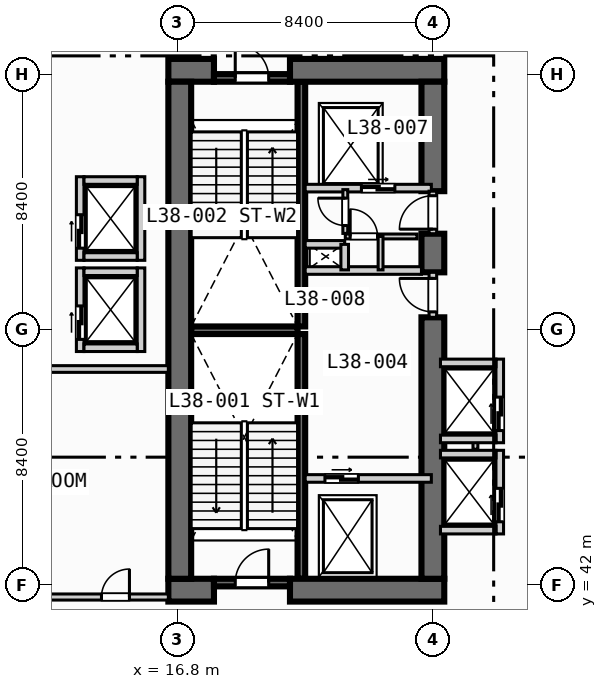
"""IFC4 building model, lengths in metres.
Left out: names, types, materials, properties, quantities, classifications, styles, units other than length and angle.
Written with IfcOpenShell. Run it as: python <this file> out.ifc"""

import sys

from ifc_helpers import new_model, si_unit, direction, frame, frame_2d, origin, place, context, subcontext, project, spatial, rectangle, extrude, element, fill, save


model = new_model("IFC4")
c1 = context("Model", 3, precision=1e-05, world=origin(), true_north=direction((0.0, 1.0)))
c2 = subcontext(c1, "Body", "Model", "MODEL_VIEW")
j1 = project(units=[si_unit("LENGTHUNIT", "METRE"), si_unit("PLANEANGLEUNIT", "RADIAN")], contexts=[c1])
p1 = place(None, origin())
s1 = spatial("IfcSite", under=j1, at=p1, CompositionType="ELEMENT")
p2 = place(p1, origin())
s2 = spatial("IfcBuilding", under=s1, at=p2, CompositionType="ELEMENT")
p3 = place(p2, frame((0.0, 0.0, 157.6)))
s3 = spatial("IfcBuildingStorey", under=s2, at=p3, CompositionType="ELEMENT", Elevation=157.6)
for number, where, z_axis, x_axis in (
    (1, (20.875, 42.2, 0.0), (0.0, 0.0, 1.0), (0.0, 1.0, 0.0)),
    (2, (20.875, 50.5, 0.0), (0.0, 0.0, 1.0), (0.0, 1.0, 0.0)),
):
    element("IfcWall", number, at=place(p3, frame(where, z_axis=z_axis, x_axis=x_axis)), inside=s3, PredefinedType="SOLIDWALL", context=c2, shape_type="SweptSolid", body=[
        extrude(rectangle(XDim=8.05, YDim=0.25, at=frame_2d((4.025, 0.0))), origin(), (0.0, 0.0, 1.0), 4.05),
    ])
p4 = place(p3, frame((17.25, 50.375, 0.0), z_axis=(0.0, 0.0, 1.0), x_axis=(1.0, 0.0, 0.0)))
e3 = element("IfcWall", 3, at=p4, inside=s3, PredefinedType="SOLIDWALL", context=c2, shape_type="SweptSolid", body=[
    extrude(rectangle(XDim=3.5, YDim=0.25, at=frame_2d((1.75, 0.0))), origin(), (0.0, 0.0, 1.0), 4.05),
])
p5 = place(p3, frame((16.5, 41.825, 0.0), z_axis=(0.0, 0.0, 1.0), x_axis=(1.0, 0.0, 0.0)))
e4 = element("IfcWall", 4, at=p5, inside=s3, PredefinedType="SHEAR", context=c2, shape_type="SweptSolid", body=[
    extrude(rectangle(XDim=1.5, YDim=0.75, at=frame_2d((0.75, 0.0))), origin(), (0.0, 0.0, 1.0), 4.05),
])
p6 = place(p3, frame((20.5, 41.825, 0.0), z_axis=(0.0, 0.0, 1.0), x_axis=(1.0, 0.0, 0.0)))
e5 = element("IfcWall", 5, at=p6, inside=s3, PredefinedType="SHEAR", context=c2, shape_type="SweptSolid", body=[
    extrude(rectangle(XDim=5.075, YDim=0.75, at=frame_2d((2.538, 0.0))), origin(), (0.0, 0.0, 1.0), 4.05),
])
p7 = place(p3, frame((16.5, 58.925, 0.0), z_axis=(0.0, 0.0, 1.0), x_axis=(1.0, 0.0, 0.0)))
e6 = element("IfcWall", 6, at=p7, inside=s3, PredefinedType="SHEAR", context=c2, shape_type="SweptSolid", body=[
    extrude(rectangle(XDim=1.5, YDim=0.75, at=frame_2d((0.75, 0.0))), origin(), (0.0, 0.0, 1.0), 4.05),
])
p8 = place(p3, frame((20.5, 58.925, 0.0), z_axis=(0.0, 0.0, 1.0), x_axis=(1.0, 0.0, 0.0)))
e7 = element("IfcWall", 7, at=p8, inside=s3, PredefinedType="SHEAR", context=c2, shape_type="SweptSolid", body=[
    extrude(rectangle(XDim=5.075, YDim=0.75, at=frame_2d((2.538, 0.0))), origin(), (0.0, 0.0, 1.0), 4.05),
])
p9 = place(p3, frame((16.875, 42.2, 0.0), z_axis=(0.0, 0.0, 1.0), x_axis=(0.0, 1.0, 0.0)))
e8 = element("IfcWall", 8, at=p9, inside=s3, PredefinedType="SHEAR", context=c2, shape_type="SweptSolid", body=[
    extrude(rectangle(XDim=16.35, YDim=0.75, at=frame_2d((8.175, 0.0))), origin(), (0.0, 0.0, 1.0), 4.05),
])
p10 = place(p3, frame((25.2, 42.2, 0.0), z_axis=(0.0, 0.0, 1.0), x_axis=(0.0, 1.0, 0.0)))
e9 = element("IfcWall", 9, at=p10, inside=s3, PredefinedType="SHEAR", context=c2, shape_type="SweptSolid", body=[
    extrude(rectangle(XDim=8.6, YDim=0.75, at=frame_2d((4.3, 0.0))), origin(), (0.0, 0.0, 1.0), 4.05),
])
p11 = place(p3, frame((25.2, 52.28, 0.0), z_axis=(0.0, 0.0, 1.0), x_axis=(0.0, 1.0, 0.0)))
e10 = element("IfcWall", 10, at=p11, inside=s3, PredefinedType="SHEAR", context=c2, shape_type="SweptSolid", body=[
    extrude(rectangle(XDim=1.27, YDim=0.75, at=frame_2d((0.635, 0.0))), origin(), (0.0, 0.0, 1.0), 4.05),
])
p12 = place(p3, frame((25.2, 54.95, 0.0), z_axis=(0.0, 0.0, 1.0), x_axis=(0.0, 1.0, 0.0)))
e11 = element("IfcWall", 11, at=p12, inside=s3, PredefinedType="SHEAR", context=c2, shape_type="SweptSolid", body=[
    extrude(rectangle(XDim=3.6, YDim=0.75, at=frame_2d((1.8, 0.0))), origin(), (0.0, 0.0, 1.0), 4.05),
])
p13 = place(p3, frame((18.0, 42.075, 0.0), z_axis=(0.0, 0.0, 1.0), x_axis=(1.0, 0.0, 0.0)))
e12 = element("IfcWall", 12, at=p13, inside=s3, PredefinedType="SOLIDWALL", context=c2, shape_type="SweptSolid", body=[
    extrude(rectangle(XDim=2.5, YDim=0.25, at=frame_2d((1.25, 0.0))), origin(), (0.0, 0.0, 1.0), 4.05),
])
p14 = place(p13, frame((0.7, 0.0, 0.0)))
e13 = element("IfcOpeningElement", 13, at=p14, cuts=e12, PredefinedType="OPENING", context=c2, shape_type="SweptSolid", body=[
    extrude(rectangle(XDim=1.1, YDim=2.15, at=frame_2d((0.55, 1.075))), frame((0.0, 0.135, 0.0), z_axis=(0.0, -1.0, 0.0), x_axis=(1.0, 0.0, 0.0)), (0.0, 0.0, 1.0), 0.27),
])
p15 = place(p3, frame((18.0, 58.675, 0.0), z_axis=(0.0, 0.0, 1.0), x_axis=(1.0, 0.0, 0.0)))
e14 = element("IfcWall", 14, at=p15, inside=s3, PredefinedType="SOLIDWALL", context=c2, shape_type="SweptSolid", body=[
    extrude(rectangle(XDim=2.5, YDim=0.25, at=frame_2d((1.25, 0.0))), origin(), (0.0, 0.0, 1.0), 4.05),
])
p16 = place(p15, frame((0.7, 0.0, 0.0)))
e15 = element("IfcOpeningElement", 15, at=p16, cuts=e14, PredefinedType="OPENING", context=c2, shape_type="SweptSolid", body=[
    extrude(rectangle(XDim=1.1, YDim=2.15, at=frame_2d((0.55, 1.075))), frame((0.0, 0.135, 0.0), z_axis=(0.0, -1.0, 0.0), x_axis=(1.0, 0.0, 0.0)), (0.0, 0.0, 1.0), 0.27),
])
p17 = place(p3, frame((21.0, 45.5, 0.0), z_axis=(0.0, 0.0, 1.0), x_axis=(1.0, 0.0, 0.0)))
e16 = element("IfcWall", 16, at=p17, inside=s3, PredefinedType="SOLIDWALL", context=c2, shape_type="SweptSolid", body=[
    extrude(rectangle(XDim=4.15, YDim=0.25, at=frame_2d((2.075, 0.0))), origin(), (0.0, 0.0, 1.0), 4.05),
])
p18 = place(p17, frame((0.65, 0.0, 0.0)))
e17 = element("IfcOpeningElement", 17, at=p18, cuts=e16, PredefinedType="OPENING", context=c2, shape_type="SweptSolid", body=[
    extrude(rectangle(XDim=1.1, YDim=2.15, at=frame_2d((0.55, 1.075))), frame((0.0, 0.135, 0.0), z_axis=(0.0, -1.0, 0.0), x_axis=(1.0, 0.0, 0.0)), (0.0, 0.0, 1.0), 0.27),
])
p19 = place(p3, frame((25.2, 50.8, 0.0), z_axis=(0.0, 0.0, 1.0), x_axis=(0.0, 1.0, 0.0)))
e18 = element("IfcWall", 18, at=p19, inside=s3, PredefinedType="SOLIDWALL", context=c2, shape_type="SweptSolid", body=[
    extrude(rectangle(XDim=1.48, YDim=0.25, at=frame_2d((0.74, 0.0))), origin(), (0.0, 0.0, 1.0), 4.05),
])
p20 = place(p19, frame((0.18, 0.0, 0.0)))
e19 = element("IfcOpeningElement", 19, at=p20, cuts=e18, PredefinedType="OPENING", context=c2, shape_type="SweptSolid", body=[
    extrude(rectangle(XDim=1.1, YDim=2.15, at=frame_2d((0.55, 1.075))), frame((0.0, 0.135, 0.0), z_axis=(0.0, -1.0, 0.0), x_axis=(1.0, 0.0, 0.0)), (0.0, 0.0, 1.0), 0.27),
])
p21 = place(p3, frame((21.0, 52.34, 0.0), z_axis=(0.0, 0.0, 1.0), x_axis=(1.0, 0.0, 0.0)))
e20 = element("IfcWall", 20, at=p21, inside=s3, PredefinedType="SOLIDWALL", context=c2, shape_type="SweptSolid", body=[
    extrude(rectangle(XDim=3.825, YDim=0.25, at=frame_2d((1.913, 0.0))), origin(), (0.0, 0.0, 1.0), 4.05),
])
p22 = place(p3, frame((21.0, 55.05, 0.0), z_axis=(0.0, 0.0, 1.0), x_axis=(1.0, 0.0, 0.0)))
e21 = element("IfcWall", 21, at=p22, inside=s3, PredefinedType="SOLIDWALL", context=c2, shape_type="SweptSolid", body=[
    extrude(rectangle(XDim=4.15, YDim=0.25, at=frame_2d((2.075, 0.0))), origin(), (0.0, 0.0, 1.0), 4.05),
])
p23 = place(p22, frame((1.85, 0.0, 0.0)))
e22 = element("IfcOpeningElement", 22, at=p23, cuts=e21, PredefinedType="OPENING", context=c2, shape_type="SweptSolid", body=[
    extrude(rectangle(XDim=1.1, YDim=2.15, at=frame_2d((0.55, 1.075))), frame((0.0, 0.135, 0.0), z_axis=(0.0, -1.0, 0.0), x_axis=(1.0, 0.0, 0.0)), (0.0, 0.0, 1.0), 0.27),
])
p24 = place(p3, frame((25.2, 53.55, 0.0), z_axis=(0.0, 0.0, 1.0), x_axis=(0.0, 1.0, 0.0)))
e23 = element("IfcWall", 23, at=p24, inside=s3, PredefinedType="SOLIDWALL", context=c2, shape_type="SweptSolid", body=[
    extrude(rectangle(XDim=1.4, YDim=0.25, at=frame_2d((0.7, 0.0))), origin(), (0.0, 0.0, 1.0), 4.05),
])
p25 = place(p24, frame((0.15, 0.0, 0.0)))
e24 = element("IfcOpeningElement", 24, at=p25, cuts=e23, PredefinedType="OPENING", context=c2, shape_type="SweptSolid", body=[
    extrude(rectangle(XDim=1.1, YDim=2.15, at=frame_2d((0.55, 1.075))), frame((0.0, 0.135, 0.0), z_axis=(0.0, -1.0, 0.0), x_axis=(1.0, 0.0, 0.0)), (0.0, 0.0, 1.0), 0.27),
])
p26 = place(p3, frame((21.0, 53.2, 0.0), z_axis=(0.0, 0.0, 1.0), x_axis=(1.0, 0.0, 0.0)))
e25 = element("IfcWall", 25, at=p26, inside=s3, PredefinedType="SOLIDWALL", context=c2, shape_type="SweptSolid", body=[
    extrude(rectangle(XDim=1.3, YDim=0.25, at=frame_2d((0.65, 0.0))), origin(), (0.0, 0.0, 1.0), 4.05),
])
p27 = place(p3, frame((22.3, 52.36, 0.0), z_axis=(0.0, 0.0, 1.0), x_axis=(0.0, 1.0, 0.0)))
e26 = element("IfcWall", 26, at=p27, inside=s3, PredefinedType="SOLIDWALL", context=c2, shape_type="SweptSolid", body=[
    extrude(rectangle(XDim=0.84, YDim=0.25, at=frame_2d((0.42, 0.0))), origin(), (0.0, 0.0, 1.0), 4.05),
])
p28 = place(p3, frame((22.32, 53.56, 0.0), z_axis=(0.0, 0.0, 1.0), x_axis=(0.0, 1.0, 0.0)))
e27 = element("IfcWall", 27, at=p28, inside=s3, PredefinedType="PARTITIONING", context=c2, shape_type="SweptSolid", body=[
    extrude(rectangle(XDim=1.44, YDim=0.16, at=frame_2d((0.72, 0.0))), origin(), (0.0, 0.0, 1.0), 4.05),
])
p29 = place(p28, frame((0.26, 0.0, 0.0)))
e28 = element("IfcOpeningElement", 28, at=p29, cuts=e27, PredefinedType="OPENING", context=c2, shape_type="SweptSolid", body=[
    extrude(rectangle(XDim=0.9, YDim=2.1, at=frame_2d((0.45, 1.05))), frame((0.0, 0.09, 0.0), z_axis=(0.0, -1.0, 0.0), x_axis=(1.0, 0.0, 0.0)), (0.0, 0.0, 1.0), 0.18),
])
p30 = place(p3, frame((22.32, 53.46, 0.0), z_axis=(0.0, 0.0, 1.0), x_axis=(1.0, 0.0, 0.0)))
e29 = element("IfcWall", 29, at=p30, inside=s3, PredefinedType="PARTITIONING", context=c2, shape_type="SweptSolid", body=[
    extrude(rectangle(XDim=2.36, YDim=0.16, at=frame_2d((1.18, 0.0))), origin(), (0.0, 0.0, 1.0), 4.05),
])
p31 = place(p30, frame((0.16, 0.0, 0.0)))
e30 = element("IfcOpeningElement", 30, at=p31, cuts=e29, PredefinedType="OPENING", context=c2, shape_type="SweptSolid", body=[
    extrude(rectangle(XDim=0.9, YDim=2.1, at=frame_2d((0.45, 1.05))), frame((0.0, 0.09, 0.0), z_axis=(0.0, -1.0, 0.0), x_axis=(1.0, 0.0, 0.0)), (0.0, 0.0, 1.0), 0.18),
])
p32 = place(p3, frame((23.48, 52.36, 0.0), z_axis=(0.0, 0.0, 1.0), x_axis=(0.0, 1.0, 0.0)))
e31 = element("IfcWall", 31, at=p32, inside=s3, PredefinedType="PARTITIONING", context=c2, shape_type="SweptSolid", body=[
    extrude(rectangle(XDim=1.1, YDim=0.16, at=frame_2d((0.55, 0.0))), origin(), (0.0, 0.0, 1.0), 4.05),
])
p33 = place(p3, frame((13.6, 49.675, 0.0), z_axis=(0.0, 0.0, 1.0), x_axis=(0.0, 1.0, 0.0)))
e32 = element("IfcWall", 32, at=p33, inside=s3, PredefinedType="SOLIDWALL", context=c2, shape_type="SweptSolid", body=[
    extrude(rectangle(XDim=2.75, YDim=0.25, at=frame_2d((1.375, 0.0))), origin(), (0.0, 0.0, 1.0), 4.05),
])
p34 = place(p33, frame((0.4, 0.0, 0.0)))
e33 = element("IfcOpeningElement", 33, at=p34, cuts=e32, PredefinedType="OPENING", context=c2, shape_type="SweptSolid", body=[
    extrude(rectangle(XDim=1.1, YDim=2.15, at=frame_2d((0.55, 1.075))), frame((0.0, 0.135, 0.0), z_axis=(0.0, -1.0, 0.0), x_axis=(1.0, 0.0, 0.0)), (0.0, 0.0, 1.0), 0.27),
])
p35 = place(p3, frame((15.6, 49.675, 0.0), z_axis=(0.0, 0.0, 1.0), x_axis=(0.0, 1.0, 0.0)))
e34 = element("IfcWall", 34, at=p35, inside=s3, PredefinedType="SOLIDWALL", context=c2, shape_type="SweptSolid", body=[
    extrude(rectangle(XDim=2.75, YDim=0.25, at=frame_2d((1.375, 0.0))), origin(), (0.0, 0.0, 1.0), 4.05),
])
for number, where, z_axis, x_axis in (
    (35, (13.725, 49.8, 0.0), (0.0, 0.0, 1.0), (1.0, 0.0, 0.0)),
    (36, (13.725, 52.3, 0.0), (0.0, 0.0, 1.0), (1.0, 0.0, 0.0)),
):
    element("IfcWall", number, at=place(p3, frame(where, z_axis=z_axis, x_axis=x_axis)), inside=s3, PredefinedType="SOLIDWALL", context=c2, shape_type="SweptSolid", body=[
        extrude(rectangle(XDim=1.75, YDim=0.25, at=frame_2d((0.875, 0.0))), origin(), (0.0, 0.0, 1.0), 4.05),
    ])
p36 = place(p3, frame((13.6, 52.675, 0.0), z_axis=(0.0, 0.0, 1.0), x_axis=(0.0, 1.0, 0.0)))
e37 = element("IfcWall", 37, at=p36, inside=s3, PredefinedType="SOLIDWALL", context=c2, shape_type="SweptSolid", body=[
    extrude(rectangle(XDim=2.75, YDim=0.25, at=frame_2d((1.375, 0.0))), origin(), (0.0, 0.0, 1.0), 4.05),
])
p37 = place(p36, frame((0.4, 0.0, 0.0)))
e38 = element("IfcOpeningElement", 38, at=p37, cuts=e37, PredefinedType="OPENING", context=c2, shape_type="SweptSolid", body=[
    extrude(rectangle(XDim=1.1, YDim=2.15, at=frame_2d((0.55, 1.075))), frame((0.0, 0.135, 0.0), z_axis=(0.0, -1.0, 0.0), x_axis=(1.0, 0.0, 0.0)), (0.0, 0.0, 1.0), 0.27),
])
p38 = place(p3, frame((15.6, 52.675, 0.0), z_axis=(0.0, 0.0, 1.0), x_axis=(0.0, 1.0, 0.0)))
e39 = element("IfcWall", 39, at=p38, inside=s3, PredefinedType="SOLIDWALL", context=c2, shape_type="SweptSolid", body=[
    extrude(rectangle(XDim=2.75, YDim=0.25, at=frame_2d((1.375, 0.0))), origin(), (0.0, 0.0, 1.0), 4.05),
])
for number, where, z_axis, x_axis in (
    (40, (13.725, 52.8, 0.0), (0.0, 0.0, 1.0), (1.0, 0.0, 0.0)),
    (41, (13.725, 55.3, 0.0), (0.0, 0.0, 1.0), (1.0, 0.0, 0.0)),
):
    element("IfcWall", number, at=place(p3, frame(where, z_axis=z_axis, x_axis=x_axis)), inside=s3, PredefinedType="SOLIDWALL", context=c2, shape_type="SweptSolid", body=[
        extrude(rectangle(XDim=1.75, YDim=0.25, at=frame_2d((0.875, 0.0))), origin(), (0.0, 0.0, 1.0), 4.05),
    ])
p39 = place(p3, frame((27.4, 43.675, 0.0), z_axis=(0.0, 0.0, 1.0), x_axis=(0.0, 1.0, 0.0)))
e42 = element("IfcWall", 42, at=p39, inside=s3, PredefinedType="SOLIDWALL", context=c2, shape_type="SweptSolid", body=[
    extrude(rectangle(XDim=2.75, YDim=0.25, at=frame_2d((1.375, 0.0))), origin(), (0.0, 0.0, 1.0), 4.05),
])
p40 = place(p39, frame((0.4, 0.0, 0.0)))
e43 = element("IfcOpeningElement", 43, at=p40, cuts=e42, PredefinedType="OPENING", context=c2, shape_type="SweptSolid", body=[
    extrude(rectangle(XDim=1.1, YDim=2.15, at=frame_2d((0.55, 1.075))), frame((0.0, 0.135, 0.0), z_axis=(0.0, -1.0, 0.0), x_axis=(1.0, 0.0, 0.0)), (0.0, 0.0, 1.0), 0.27),
])
for number, where, z_axis, x_axis in (
    (44, (25.45, 43.8, 0.0), (0.0, 0.0, 1.0), (1.0, 0.0, 0.0)),
    (45, (25.45, 46.3, 0.0), (0.0, 0.0, 1.0), (1.0, 0.0, 0.0)),
):
    element("IfcWall", number, at=place(p3, frame(where, z_axis=z_axis, x_axis=x_axis)), inside=s3, PredefinedType="SOLIDWALL", context=c2, shape_type="SweptSolid", body=[
        extrude(rectangle(XDim=1.825, YDim=0.25, at=frame_2d((0.913, 0.0))), origin(), (0.0, 0.0, 1.0), 4.05),
    ])
p41 = place(p3, frame((26.6, 46.46, 0.0), z_axis=(0.0, 0.0, 1.0), x_axis=(0.0, 1.0, 0.0)))
e46 = element("IfcWall", 46, at=p41, inside=s3, PredefinedType="PARTITIONING", context=c2, shape_type="SweptSolid", body=[
    extrude(rectangle(XDim=0.88, YDim=0.16, at=frame_2d((0.44, 0.0))), origin(), (0.0, 0.0, 1.0), 4.05),
])
p42 = place(p3, frame((27.4, 46.675, 0.0), z_axis=(0.0, 0.0, 1.0), x_axis=(0.0, 1.0, 0.0)))
e47 = element("IfcWall", 47, at=p42, inside=s3, PredefinedType="SOLIDWALL", context=c2, shape_type="SweptSolid", body=[
    extrude(rectangle(XDim=2.75, YDim=0.25, at=frame_2d((1.375, 0.0))), origin(), (0.0, 0.0, 1.0), 4.05),
])
p43 = place(p42, frame((0.4, 0.0, 0.0)))
e48 = element("IfcOpeningElement", 48, at=p43, cuts=e47, PredefinedType="OPENING", context=c2, shape_type="SweptSolid", body=[
    extrude(rectangle(XDim=1.1, YDim=2.15, at=frame_2d((0.55, 1.075))), frame((0.0, 0.135, 0.0), z_axis=(0.0, -1.0, 0.0), x_axis=(1.0, 0.0, 0.0)), (0.0, 0.0, 1.0), 0.27),
])
for number, where, z_axis, x_axis in (
    (49, (25.45, 46.8, 0.0), (0.0, 0.0, 1.0), (1.0, 0.0, 0.0)),
    (50, (25.45, 49.3, 0.0), (0.0, 0.0, 1.0), (1.0, 0.0, 0.0)),
):
    element("IfcWall", number, at=place(p3, frame(where, z_axis=z_axis, x_axis=x_axis)), inside=s3, PredefinedType="SOLIDWALL", context=c2, shape_type="SweptSolid", body=[
        extrude(rectangle(XDim=1.825, YDim=0.25, at=frame_2d((0.913, 0.0))), origin(), (0.0, 0.0, 1.0), 4.05),
    ])
p44 = place(p3, frame((0.3, 41.6, 0.0), z_axis=(0.0, 0.0, 1.0), x_axis=(1.0, 0.0, 0.0)))
e51 = element("IfcWall", 51, at=p44, inside=s3, PredefinedType="PARTITIONING", context=c2, shape_type="SweptSolid", body=[
    extrude(rectangle(XDim=16.2, YDim=0.2, at=frame_2d((8.1, 0.0))), origin(), (0.0, 0.0, 1.0), 4.05),
])
p45 = place(p44, frame((14.0, 0.0, 0.0)))
e52 = element("IfcOpeningElement", 52, at=p45, cuts=e51, PredefinedType="OPENING", context=c2, shape_type="SweptSolid", body=[
    extrude(rectangle(XDim=0.92, YDim=2.1, at=frame_2d((0.46, 1.05))), frame((0.0, 0.11, 0.0), z_axis=(0.0, -1.0, 0.0), x_axis=(1.0, 0.0, 0.0)), (0.0, 0.0, 1.0), 0.22),
])
p46 = place(p3, frame((0.3, 49.1, 0.0), z_axis=(0.0, 0.0, 1.0), x_axis=(1.0, 0.0, 0.0)))
e53 = element("IfcWall", 53, at=p46, inside=s3, PredefinedType="PARTITIONING", context=c2, shape_type="SweptSolid", body=[
    extrude(rectangle(XDim=16.2, YDim=0.22, at=frame_2d((8.1, 0.0))), origin(), (0.0, 0.0, 1.0), 4.05),
])
p47 = place(p14, origin())
e54 = element("IfcDoor", 54, at=p47, inside=s3, OperationType="SINGLE_SWING_RIGHT", PredefinedType="DOOR", context=c2, shape_type="SweptSolid", body=[
    extrude(rectangle(XDim=1.1, YDim=2.15, at=frame_2d((0.55, 1.075))), frame((0.0, 0.025, 0.0), z_axis=(0.0, -1.0, 0.0), x_axis=(1.0, 0.0, 0.0)), (0.0, 0.0, 1.0), 0.05),
])
fill(e13, e54)
p48 = place(p16, origin())
e55 = element("IfcDoor", 55, at=p48, inside=s3, OperationType="SINGLE_SWING_LEFT", PredefinedType="DOOR", context=c2, shape_type="SweptSolid", body=[
    extrude(rectangle(XDim=1.1, YDim=2.15, at=frame_2d((0.55, 1.075))), frame((0.0, 0.025, 0.0), z_axis=(0.0, -1.0, 0.0), x_axis=(1.0, 0.0, 0.0)), (0.0, 0.0, 1.0), 0.05),
])
fill(e15, e55)
p49 = place(p18, origin())
e56 = element("IfcDoor", 56, at=p49, inside=s3, OperationType="SLIDING_TO_LEFT", PredefinedType="DOOR", context=c2, shape_type="SweptSolid", body=[
    extrude(rectangle(XDim=1.1, YDim=2.15, at=frame_2d((0.55, 1.075))), frame((0.0, 0.025, 0.0), z_axis=(0.0, -1.0, 0.0), x_axis=(1.0, 0.0, 0.0)), (0.0, 0.0, 1.0), 0.05),
])
fill(e17, e56)
p50 = place(p20, origin())
e57 = element("IfcDoor", 57, at=p50, inside=s3, OperationType="SINGLE_SWING_RIGHT", PredefinedType="DOOR", context=c2, shape_type="SweptSolid", body=[
    extrude(rectangle(XDim=1.1, YDim=2.15, at=frame_2d((0.55, 1.075))), frame((0.0, 0.025, 0.0), z_axis=(0.0, -1.0, 0.0), x_axis=(1.0, 0.0, 0.0)), (0.0, 0.0, 1.0), 0.05),
])
fill(e19, e57)
p51 = place(p23, origin())
e58 = element("IfcDoor", 58, at=p51, inside=s3, OperationType="SLIDING_TO_LEFT", PredefinedType="DOOR", context=c2, shape_type="SweptSolid", body=[
    extrude(rectangle(XDim=1.1, YDim=2.15, at=frame_2d((0.55, 1.075))), frame((0.0, 0.025, 0.0), z_axis=(0.0, -1.0, 0.0), x_axis=(1.0, 0.0, 0.0)), (0.0, 0.0, 1.0), 0.05),
])
fill(e22, e58)
p52 = place(p25, origin())
e59 = element("IfcDoor", 59, at=p52, inside=s3, OperationType="SINGLE_SWING_LEFT", PredefinedType="DOOR", context=c2, shape_type="SweptSolid", body=[
    extrude(rectangle(XDim=1.1, YDim=2.15, at=frame_2d((0.55, 1.075))), frame((0.0, 0.025, 0.0), z_axis=(0.0, -1.0, 0.0), x_axis=(1.0, 0.0, 0.0)), (0.0, 0.0, 1.0), 0.05),
])
fill(e24, e59)
p53 = place(p29, origin())
e60 = element("IfcDoor", 60, at=p53, inside=s3, OperationType="SINGLE_SWING_RIGHT", PredefinedType="DOOR", context=c2, shape_type="SweptSolid", body=[
    extrude(rectangle(XDim=0.9, YDim=2.1, at=frame_2d((0.45, 1.05))), frame((0.0, 0.025, 0.0), z_axis=(0.0, -1.0, 0.0), x_axis=(1.0, 0.0, 0.0)), (0.0, 0.0, 1.0), 0.05),
])
fill(e28, e60)
p54 = place(p31, origin())
e61 = element("IfcDoor", 61, at=p54, inside=s3, OperationType="SINGLE_SWING_LEFT", PredefinedType="DOOR", context=c2, shape_type="SweptSolid", body=[
    extrude(rectangle(XDim=0.9, YDim=2.1, at=frame_2d((0.45, 1.05))), frame((0.0, 0.025, 0.0), z_axis=(0.0, -1.0, 0.0), x_axis=(1.0, 0.0, 0.0)), (0.0, 0.0, 1.0), 0.05),
])
fill(e30, e61)
p55 = place(p34, origin())
e62 = element("IfcDoor", 62, at=p55, inside=s3, OperationType="SLIDING_TO_LEFT", PredefinedType="DOOR", context=c2, shape_type="SweptSolid", body=[
    extrude(rectangle(XDim=1.1, YDim=2.15, at=frame_2d((0.55, 1.075))), frame((0.0, 0.025, 0.0), z_axis=(0.0, -1.0, 0.0), x_axis=(1.0, 0.0, 0.0)), (0.0, 0.0, 1.0), 0.05),
])
fill(e33, e62)
p56 = place(p37, origin())
e63 = element("IfcDoor", 63, at=p56, inside=s3, OperationType="SLIDING_TO_LEFT", PredefinedType="DOOR", context=c2, shape_type="SweptSolid", body=[
    extrude(rectangle(XDim=1.1, YDim=2.15, at=frame_2d((0.55, 1.075))), frame((0.0, 0.025, 0.0), z_axis=(0.0, -1.0, 0.0), x_axis=(1.0, 0.0, 0.0)), (0.0, 0.0, 1.0), 0.05),
])
fill(e38, e63)
p57 = place(p40, origin())
e64 = element("IfcDoor", 64, at=p57, inside=s3, OperationType="SLIDING_TO_LEFT", PredefinedType="DOOR", context=c2, shape_type="SweptSolid", body=[
    extrude(rectangle(XDim=1.1, YDim=2.15, at=frame_2d((0.55, 1.075))), frame((0.0, 0.025, 0.0), z_axis=(0.0, -1.0, 0.0), x_axis=(1.0, 0.0, 0.0)), (0.0, 0.0, 1.0), 0.05),
])
fill(e43, e64)
p58 = place(p43, origin())
e65 = element("IfcDoor", 65, at=p58, inside=s3, OperationType="SLIDING_TO_LEFT", PredefinedType="DOOR", context=c2, shape_type="SweptSolid", body=[
    extrude(rectangle(XDim=1.1, YDim=2.15, at=frame_2d((0.55, 1.075))), frame((0.0, 0.025, 0.0), z_axis=(0.0, -1.0, 0.0), x_axis=(1.0, 0.0, 0.0)), (0.0, 0.0, 1.0), 0.05),
])
fill(e48, e65)
p59 = place(p45, origin())
e66 = element("IfcDoor", 66, at=p59, inside=s3, OperationType="SINGLE_SWING_RIGHT", PredefinedType="DOOR", context=c2, shape_type="SweptSolid", body=[
    extrude(rectangle(XDim=0.92, YDim=2.1, at=frame_2d((0.46, 1.05))), frame((0.0, 0.025, 0.0), z_axis=(0.0, -1.0, 0.0), x_axis=(1.0, 0.0, 0.0)), (0.0, 0.0, 1.0), 0.05),
])
fill(e52, e66)
save(model, sys.argv[1])
